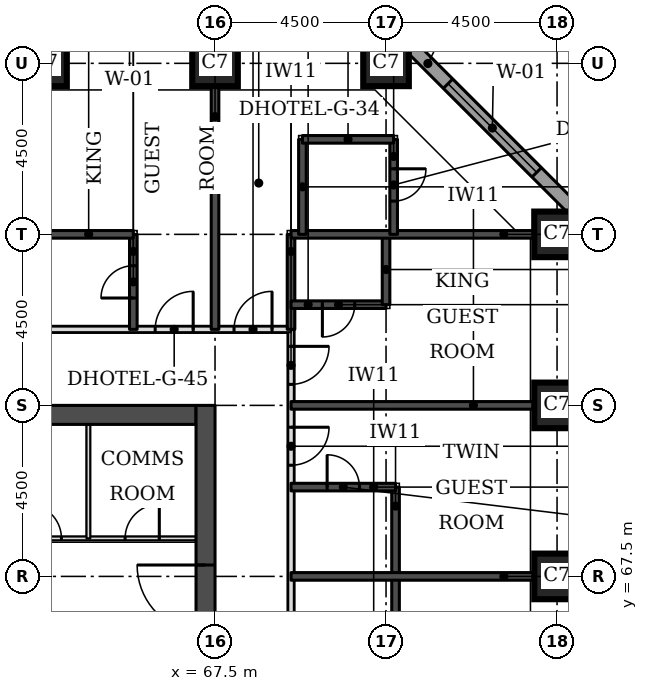
"""IFC4 building model, lengths in metres.
Left out: names, types, materials, properties, quantities, classifications, styles, units other than length and angle.
Written with IfcOpenShell. Run it as: python <this file> out.ifc"""

import sys

from ifc_helpers import new_model, si_unit, direction, frame, frame_2d, origin, origin_2d, place, context, subcontext, project, spatial, rectangle, extrude, element, fill, save


model = new_model("IFC4")
c1 = context("Model", 3, precision=1e-05, world=origin(), true_north=direction((0.0, 1.0)))
c2 = subcontext(c1, "Body", "Model", "MODEL_VIEW")
j1 = project(units=[si_unit("LENGTHUNIT", "METRE"), si_unit("PLANEANGLEUNIT", "RADIAN")], contexts=[c1])
p1 = place(None, origin())
s1 = spatial("IfcSite", under=j1, at=p1, CompositionType="ELEMENT")
p2 = place(p1, origin())
s2 = spatial("IfcBuilding", under=s1, at=p2, CompositionType="ELEMENT")
p3 = place(p2, frame((0.0, 0.0, 66.0)))
s3 = spatial("IfcBuildingStorey", under=s2, at=p3, CompositionType="ELEMENT", Elevation=66.0)
for number, where, z_axis, x_axis in (
    (1, (76.5, 67.5, 0.0), (0.0, 0.0, 1.0), (1.0, 0.0, 0.0)),
    (2, (76.5, 72.0, 0.0), (0.0, 0.0, 1.0), (1.0, 0.0, 0.0)),
    (3, (76.5, 76.5, 0.0), (0.0, 0.0, 1.0), (1.0, 0.0, 0.0)),
    (4, (63.0, 81.0, 0.0), (0.0, 0.0, 1.0), (1.0, 0.0, 0.0)),
    (5, (67.5, 81.0, 0.0), (0.0, 0.0, 1.0), (1.0, 0.0, 0.0)),
    (6, (72.0, 81.0, 0.0), (0.0, 0.0, 1.0), (1.0, 0.0, 0.0)),
):
    element("IfcColumn", number, at=place(p3, frame(where, z_axis=z_axis, x_axis=x_axis)), inside=s3, PredefinedType="COLUMN", context=c2, shape_type="SweptSolid", body=[
        extrude(rectangle(XDim=1.2, YDim=1.2, at=origin_2d()), origin(), (0.0, 0.0, 1.0), 3.3),
    ])
p4 = place(p3, frame((45.5, 71.75, 0.0), z_axis=(0.0, 0.0, 1.0), x_axis=(1.0, 0.0, 0.0)))
e7 = element("IfcWall", 7, at=p4, inside=s3, PredefinedType="SHEAR", context=c2, shape_type="SweptSolid", body=[
    extrude(rectangle(XDim=21.5, YDim=0.5, at=frame_2d((10.75, 0.0))), origin(), (0.0, 0.0, 1.0), 3.3),
])
p5 = place(p3, frame((67.25, 49.5, 0.0), z_axis=(0.0, 0.0, 1.0), x_axis=(0.0, 1.0, 0.0)))
e8 = element("IfcWall", 8, at=p5, inside=s3, PredefinedType="SHEAR", context=c2, shape_type="SweptSolid", body=[
    extrude(rectangle(XDim=22.5, YDim=0.5, at=frame_2d((11.25, 0.0))), origin(), (0.0, 0.0, 1.0), 3.3),
])
p6 = place(p5, frame((4.2, 0.0, 0.0)))
e9 = element("IfcOpeningElement", 9, at=p6, cuts=e8, PredefinedType="OPENING", context=c2, shape_type="SweptSolid", body=[
    extrude(rectangle(XDim=1.8, YDim=2.1, at=frame_2d((0.9, 1.05))), frame((0.0, 0.26, 0.0), z_axis=(0.0, -1.0, 0.0), x_axis=(1.0, 0.0, 0.0)), (0.0, 0.0, 1.0), 0.52),
])
p7 = place(p5, frame((6.9, 0.0, 0.0)))
e10 = element("IfcOpeningElement", 10, at=p7, cuts=e8, PredefinedType="OPENING", context=c2, shape_type="SweptSolid", body=[
    extrude(rectangle(XDim=1.1, YDim=2.1, at=frame_2d((0.55, 1.05))), frame((0.0, 0.26, 0.0), z_axis=(0.0, -1.0, 0.0), x_axis=(1.0, 0.0, 0.0)), (0.0, 0.0, 1.0), 0.52),
])
p8 = place(p5, frame((13.6, 0.0, 0.0)))
e11 = element("IfcOpeningElement", 11, at=p8, cuts=e8, PredefinedType="OPENING", context=c2, shape_type="SweptSolid", body=[
    extrude(rectangle(XDim=1.1, YDim=2.1, at=frame_2d((0.55, 1.05))), frame((0.0, 0.26, 0.0), z_axis=(0.0, -1.0, 0.0), x_axis=(1.0, 0.0, 0.0)), (0.0, 0.0, 1.0), 0.52),
])
p9 = place(p5, frame((16.5, 0.0, 0.0)))
e12 = element("IfcOpeningElement", 12, at=p9, cuts=e8, PredefinedType="OPENING", context=c2, shape_type="SweptSolid", body=[
    extrude(rectangle(XDim=1.8, YDim=2.1, at=frame_2d((0.9, 1.05))), frame((0.0, 0.26, 0.0), z_axis=(0.0, -1.0, 0.0), x_axis=(1.0, 0.0, 0.0)), (0.0, 0.0, 1.0), 0.52),
])
p10 = place(p3, frame((77.326, 76.77, 0.0), z_axis=(0.0, 0.0, 1.0), x_axis=(-0.707106781187, 0.707106781187, 0.0)))
e13 = element("IfcWall", 13, at=p10, inside=s3, PredefinedType="STANDARD", context=c2, shape_type="SweptSolid", body=[
    extrude(rectangle(XDim=7.151, YDim=0.35, at=frame_2d((3.576, 0.0))), origin(), (0.0, 0.0, 1.0), 3.055),
])
p11 = place(p10, frame((1.926, 0.0, 0.8)))
e14 = element("IfcOpeningElement", 14, at=p11, cuts=e13, PredefinedType="OPENING", context=c2, shape_type="SweptSolid", body=[
    extrude(rectangle(XDim=3.3, YDim=1.5, at=frame_2d((1.65, 0.75))), frame((0.0, 0.185, 0.0), z_axis=(0.0, -1.0, 0.0), x_axis=(1.0, 0.0, 0.0)), (0.0, 0.0, 1.0), 0.37),
])
p12 = place(p3, frame((69.5, 47.5, 0.0), z_axis=(0.0, 0.0, 1.0), x_axis=(0.0, 1.0, 0.0)))
e15 = element("IfcWall", 15, at=p12, inside=s3, PredefinedType="PARTITIONING", context=c2, shape_type="SweptSolid", body=[
    extrude(rectangle(XDim=26.5, YDim=0.15, at=frame_2d((13.25, 0.0))), origin(), (0.0, 0.0, 1.0), 3.08),
])
p13 = place(p12, frame((25.053, 0.0, 0.0)))
e16 = element("IfcOpeningElement", 16, at=p13, cuts=e15, PredefinedType="OPENING", context=c2, shape_type="SweptSolid", body=[
    extrude(rectangle(XDim=1.0, YDim=2.1, at=frame_2d((0.5, 1.05))), frame((0.0, 0.085, 0.0), z_axis=(0.0, -1.0, 0.0), x_axis=(1.0, 0.0, 0.0)), (0.0, 0.0, 1.0), 0.17),
])
p14 = place(p12, frame((22.925, 0.0, 0.0)))
e17 = element("IfcOpeningElement", 17, at=p14, cuts=e15, PredefinedType="OPENING", context=c2, shape_type="SweptSolid", body=[
    extrude(rectangle(XDim=1.0, YDim=2.1, at=frame_2d((0.5, 1.05))), frame((0.0, 0.085, 0.0), z_axis=(0.0, -1.0, 0.0), x_axis=(1.0, 0.0, 0.0)), (0.0, 0.0, 1.0), 0.17),
])
p15 = place(p12, frame((16.325, 0.0, 0.0)))
e18 = element("IfcOpeningElement", 18, at=p15, cuts=e15, PredefinedType="OPENING", context=c2, shape_type="SweptSolid", body=[
    extrude(rectangle(XDim=1.0, YDim=2.1, at=frame_2d((0.5, 1.05))), frame((0.0, 0.085, 0.0), z_axis=(0.0, -1.0, 0.0), x_axis=(1.0, 0.0, 0.0)), (0.0, 0.0, 1.0), 0.17),
])
p16 = place(p12, frame((13.925, 0.0, 0.0)))
e19 = element("IfcOpeningElement", 19, at=p16, cuts=e15, PredefinedType="OPENING", context=c2, shape_type="SweptSolid", body=[
    extrude(rectangle(XDim=1.0, YDim=2.1, at=frame_2d((0.5, 1.05))), frame((0.0, 0.085, 0.0), z_axis=(0.0, -1.0, 0.0), x_axis=(1.0, 0.0, 0.0)), (0.0, 0.0, 1.0), 0.17),
])
p17 = place(p12, frame((4.25, 0.0, 0.0)))
e20 = element("IfcOpeningElement", 20, at=p17, cuts=e15, PredefinedType="OPENING", context=c2, shape_type="SweptSolid", body=[
    extrude(rectangle(XDim=1.1, YDim=2.1, at=frame_2d((0.55, 1.05))), frame((0.0, 0.085, 0.0), z_axis=(0.0, -1.0, 0.0), x_axis=(1.0, 0.0, 0.0)), (0.0, 0.0, 1.0), 0.17),
])
p18 = place(p12, frame((0.447, 0.0, 0.0)))
e21 = element("IfcOpeningElement", 21, at=p18, cuts=e15, PredefinedType="OPENING", context=c2, shape_type="SweptSolid", body=[
    extrude(rectangle(XDim=1.0, YDim=2.1, at=frame_2d((0.5, 1.05))), frame((0.0, 0.085, 0.0), z_axis=(0.0, -1.0, 0.0), x_axis=(1.0, 0.0, 0.0)), (0.0, 0.0, 1.0), 0.17),
])
p19 = place(p3, frame((43.0, 74.0, 0.0), z_axis=(0.0, 0.0, 1.0), x_axis=(1.0, 0.0, 0.0)))
e22 = element("IfcWall", 22, at=p19, inside=s3, PredefinedType="PARTITIONING", context=c2, shape_type="SweptSolid", body=[
    extrude(rectangle(XDim=26.5, YDim=0.15, at=frame_2d((13.25, 0.0))), origin(), (0.0, 0.0, 1.0), 3.08),
])
p20 = place(p19, frame((4.925, 0.0, 0.0)))
e23 = element("IfcOpeningElement", 23, at=p20, cuts=e22, PredefinedType="OPENING", context=c2, shape_type="SweptSolid", body=[
    extrude(rectangle(XDim=1.0, YDim=2.1, at=frame_2d((0.5, 1.05))), frame((0.0, 0.085, 0.0), z_axis=(0.0, -1.0, 0.0), x_axis=(1.0, 0.0, 0.0)), (0.0, 0.0, 1.0), 0.17),
])
p21 = place(p19, frame((7.325, 0.0, 0.0)))
e24 = element("IfcOpeningElement", 24, at=p21, cuts=e22, PredefinedType="OPENING", context=c2, shape_type="SweptSolid", body=[
    extrude(rectangle(XDim=1.0, YDim=2.1, at=frame_2d((0.5, 1.05))), frame((0.0, 0.085, 0.0), z_axis=(0.0, -1.0, 0.0), x_axis=(1.0, 0.0, 0.0)), (0.0, 0.0, 1.0), 0.17),
])
p22 = place(p19, frame((13.925, 0.0, 0.0)))
e25 = element("IfcOpeningElement", 25, at=p22, cuts=e22, PredefinedType="OPENING", context=c2, shape_type="SweptSolid", body=[
    extrude(rectangle(XDim=1.0, YDim=2.1, at=frame_2d((0.5, 1.05))), frame((0.0, 0.085, 0.0), z_axis=(0.0, -1.0, 0.0), x_axis=(1.0, 0.0, 0.0)), (0.0, 0.0, 1.0), 0.17),
])
p23 = place(p19, frame((16.325, 0.0, 0.0)))
e26 = element("IfcOpeningElement", 26, at=p23, cuts=e22, PredefinedType="OPENING", context=c2, shape_type="SweptSolid", body=[
    extrude(rectangle(XDim=1.0, YDim=2.1, at=frame_2d((0.5, 1.05))), frame((0.0, 0.085, 0.0), z_axis=(0.0, -1.0, 0.0), x_axis=(1.0, 0.0, 0.0)), (0.0, 0.0, 1.0), 0.17),
])
p24 = place(p19, frame((22.925, 0.0, 0.0)))
e27 = element("IfcOpeningElement", 27, at=p24, cuts=e22, PredefinedType="OPENING", context=c2, shape_type="SweptSolid", body=[
    extrude(rectangle(XDim=1.0, YDim=2.1, at=frame_2d((0.5, 1.05))), frame((0.0, 0.085, 0.0), z_axis=(0.0, -1.0, 0.0), x_axis=(1.0, 0.0, 0.0)), (0.0, 0.0, 1.0), 0.17),
])
p25 = place(p19, frame((0.5, 0.0, 0.0)))
e28 = element("IfcOpeningElement", 28, at=p25, cuts=e22, PredefinedType="OPENING", context=c2, shape_type="SweptSolid", body=[
    extrude(rectangle(XDim=1.0, YDim=2.1, at=frame_2d((0.5, 1.05))), frame((0.0, 0.085, 0.0), z_axis=(0.0, -1.0, 0.0), x_axis=(1.0, 0.0, 0.0)), (0.0, 0.0, 1.0), 0.17),
])
p26 = place(p19, frame((25.0, 0.0, 0.0)))
e29 = element("IfcOpeningElement", 29, at=p26, cuts=e22, PredefinedType="OPENING", context=c2, shape_type="SweptSolid", body=[
    extrude(rectangle(XDim=1.0, YDim=2.1, at=frame_2d((0.5, 1.05))), frame((0.0, 0.085, 0.0), z_axis=(0.0, -1.0, 0.0), x_axis=(1.0, 0.0, 0.0)), (0.0, 0.0, 1.0), 0.17),
])
p27 = place(p3, frame((72.25, 65.65, 0.0), z_axis=(0.0, 0.0, 1.0), x_axis=(0.0, 1.0, 0.0)))
e30 = element("IfcWall", 30, at=p27, inside=s3, PredefinedType="SOLIDWALL", context=c2, shape_type="SweptSolid", body=[
    extrude(rectangle(XDim=4.2, YDim=0.2, at=frame_2d((2.1, 0.0))), origin(), (0.0, 0.0, 1.0), 3.08),
])
p28 = place(p3, frame((69.5, 67.5, 0.0), z_axis=(0.0, 0.0, 1.0), x_axis=(1.0, 0.0, 0.0)))
e31 = element("IfcWall", 31, at=p28, inside=s3, PredefinedType="SOLIDWALL", context=c2, shape_type="SweptSolid", body=[
    extrude(rectangle(XDim=6.4, YDim=0.2, at=frame_2d((3.2, 0.0))), origin(), (0.0, 0.0, 1.0), 3.08),
])
p29 = place(p3, frame((69.5, 69.85, 0.0), z_axis=(0.0, 0.0, 1.0), x_axis=(1.0, 0.0, 0.0)))
e32 = element("IfcWall", 32, at=p29, inside=s3, PredefinedType="SOLIDWALL", context=c2, shape_type="SweptSolid", body=[
    extrude(rectangle(XDim=2.75, YDim=0.2, at=frame_2d((1.375, 0.0))), origin(), (0.0, 0.0, 1.0), 3.08),
])
p30 = place(p29, frame((0.95, 0.0, 0.0)))
e33 = element("IfcOpeningElement", 33, at=p30, cuts=e32, PredefinedType="OPENING", context=c2, shape_type="SweptSolid", body=[
    extrude(rectangle(XDim=0.85, YDim=2.1, at=frame_2d((0.425, 1.05))), frame((0.0, 0.11, 0.0), z_axis=(0.0, -1.0, 0.0), x_axis=(1.0, 0.0, 0.0)), (0.0, 0.0, 1.0), 0.22),
])
p31 = place(p3, frame((69.5, 72.0, 0.0), z_axis=(0.0, 0.0, 1.0), x_axis=(1.0, 0.0, 0.0)))
e34 = element("IfcWall", 34, at=p31, inside=s3, PredefinedType="SOLIDWALL", context=c2, shape_type="SweptSolid", body=[
    extrude(rectangle(XDim=6.4, YDim=0.2, at=frame_2d((3.2, 0.0))), origin(), (0.0, 0.0, 1.0), 3.08),
])
p32 = place(p3, frame((65.35, 74.0, 0.0), z_axis=(0.0, 0.0, 1.0), x_axis=(0.0, 1.0, 0.0)))
e35 = element("IfcWall", 35, at=p32, inside=s3, PredefinedType="SOLIDWALL", context=c2, shape_type="SweptSolid", body=[
    extrude(rectangle(XDim=2.5, YDim=0.2, at=frame_2d((1.25, 0.0))), origin(), (0.0, 0.0, 1.0), 3.08),
])
p33 = place(p32, frame((0.825, 0.0, 0.0)))
e36 = element("IfcOpeningElement", 36, at=p33, cuts=e35, PredefinedType="OPENING", context=c2, shape_type="SweptSolid", body=[
    extrude(rectangle(XDim=0.85, YDim=2.1, at=frame_2d((0.425, 1.05))), frame((0.0, 0.11, 0.0), z_axis=(0.0, -1.0, 0.0), x_axis=(1.0, 0.0, 0.0)), (0.0, 0.0, 1.0), 0.22),
])
p34 = place(p3, frame((67.5, 74.0, 0.0), z_axis=(0.0, 0.0, 1.0), x_axis=(0.0, 1.0, 0.0)))
e37 = element("IfcWall", 37, at=p34, inside=s3, PredefinedType="SOLIDWALL", context=c2, shape_type="SweptSolid", body=[
    extrude(rectangle(XDim=6.4, YDim=0.2, at=frame_2d((3.2, 0.0))), origin(), (0.0, 0.0, 1.0), 3.08),
])
p35 = place(p3, frame((69.5, 74.0, 0.0), z_axis=(0.0, 0.0, 1.0), x_axis=(0.0, 1.0, 0.0)))
e38 = element("IfcWall", 38, at=p35, inside=s3, PredefinedType="SOLIDWALL", context=c2, shape_type="SweptSolid", body=[
    extrude(rectangle(XDim=2.5, YDim=0.2, at=frame_2d((1.25, 0.0))), origin(), (0.0, 0.0, 1.0), 3.08),
])
p36 = place(p3, frame((69.5, 74.65, 0.0), z_axis=(0.0, 0.0, 1.0), x_axis=(1.0, 0.0, 0.0)))
e39 = element("IfcWall", 39, at=p36, inside=s3, PredefinedType="SOLIDWALL", context=c2, shape_type="SweptSolid", body=[
    extrude(rectangle(XDim=2.5, YDim=0.2, at=frame_2d((1.25, 0.0))), origin(), (0.0, 0.0, 1.0), 3.08),
])
p37 = place(p36, frame((0.825, 0.0, 0.0)))
e40 = element("IfcOpeningElement", 40, at=p37, cuts=e39, PredefinedType="OPENING", context=c2, shape_type="SweptSolid", body=[
    extrude(rectangle(XDim=0.85, YDim=2.1, at=frame_2d((0.425, 1.05))), frame((0.0, 0.11, 0.0), z_axis=(0.0, -1.0, 0.0), x_axis=(1.0, 0.0, 0.0)), (0.0, 0.0, 1.0), 0.22),
])
p38 = place(p3, frame((72.0, 74.65, 0.0), z_axis=(0.0, 0.0, 1.0), x_axis=(0.0, 1.0, 0.0)))
e41 = element("IfcWall", 41, at=p38, inside=s3, PredefinedType="SOLIDWALL", context=c2, shape_type="SweptSolid", body=[
    extrude(rectangle(XDim=1.85, YDim=0.2, at=frame_2d((0.925, 0.0))), origin(), (0.0, 0.0, 1.0), 3.08),
])
p39 = place(p3, frame((63.0, 76.5, 0.0), z_axis=(0.0, 0.0, 1.0), x_axis=(1.0, 0.0, 0.0)))
e42 = element("IfcWall", 42, at=p39, inside=s3, PredefinedType="SOLIDWALL", context=c2, shape_type="SweptSolid", body=[
    extrude(rectangle(XDim=2.35, YDim=0.2, at=frame_2d((1.175, 0.0))), origin(), (0.0, 0.0, 1.0), 3.08),
])
p40 = place(p3, frame((69.5, 76.5, 0.0), z_axis=(0.0, 0.0, 1.0), x_axis=(1.0, 0.0, 0.0)))
e43 = element("IfcWall", 43, at=p40, inside=s3, PredefinedType="SOLIDWALL", context=c2, shape_type="SweptSolid", body=[
    extrude(rectangle(XDim=6.4, YDim=0.2, at=frame_2d((3.2, 0.0))), origin(), (0.0, 0.0, 1.0), 3.08),
])
p41 = place(p3, frame((69.8, 76.5, 0.0), z_axis=(0.0, 0.0, 1.0), x_axis=(0.0, 1.0, 0.0)))
e44 = element("IfcWall", 44, at=p41, inside=s3, PredefinedType="SOLIDWALL", context=c2, shape_type="SweptSolid", body=[
    extrude(rectangle(XDim=2.5, YDim=0.2, at=frame_2d((1.25, 0.0))), origin(), (0.0, 0.0, 1.0), 3.08),
])
p42 = place(p3, frame((72.2, 76.5, 0.0), z_axis=(0.0, 0.0, 1.0), x_axis=(0.0, 1.0, 0.0)))
e45 = element("IfcWall", 45, at=p42, inside=s3, PredefinedType="SOLIDWALL", context=c2, shape_type="SweptSolid", body=[
    extrude(rectangle(XDim=2.5, YDim=0.2, at=frame_2d((1.25, 0.0))), origin(), (0.0, 0.0, 1.0), 3.08),
])
p43 = place(p42, frame((0.875, 0.0, 0.0)))
e46 = element("IfcOpeningElement", 46, at=p43, cuts=e45, PredefinedType="OPENING", context=c2, shape_type="SweptSolid", body=[
    extrude(rectangle(XDim=0.85, YDim=2.1, at=frame_2d((0.425, 1.05))), frame((0.0, 0.11, 0.0), z_axis=(0.0, -1.0, 0.0), x_axis=(1.0, 0.0, 0.0)), (0.0, 0.0, 1.0), 0.22),
])
p44 = place(p3, frame((69.8, 79.0, 0.0), z_axis=(0.0, 0.0, 1.0), x_axis=(1.0, 0.0, 0.0)))
e47 = element("IfcWall", 47, at=p44, inside=s3, PredefinedType="SOLIDWALL", context=c2, shape_type="SweptSolid", body=[
    extrude(rectangle(XDim=2.4, YDim=0.2, at=frame_2d((1.2, 0.0))), origin(), (0.0, 0.0, 1.0), 3.08),
])
p45 = place(p3, frame((61.85, 68.5, 0.0), z_axis=(0.0, 0.0, 1.0), x_axis=(1.0, 0.0, 0.0)))
e48 = element("IfcWall", 48, at=p45, inside=s3, PredefinedType="PARTITIONING", context=c2, shape_type="SweptSolid", body=[
    extrude(rectangle(XDim=5.15, YDim=0.1, at=frame_2d((2.575, 0.0))), origin(), (0.0, 0.0, 1.0), 3.08),
])
p46 = place(p45, frame((3.284, 0.0, 0.0)))
e49 = element("IfcOpeningElement", 49, at=p46, cuts=e48, PredefinedType="OPENING", context=c2, shape_type="SweptSolid", body=[
    extrude(rectangle(XDim=0.9, YDim=2.1, at=frame_2d((0.45, 1.05))), frame((0.0, 0.06, 0.0), z_axis=(0.0, -1.0, 0.0), x_axis=(1.0, 0.0, 0.0)), (0.0, 0.0, 1.0), 0.12),
])
p47 = place(p45, frame((0.709, 0.0, 0.0)))
e50 = element("IfcOpeningElement", 50, at=p47, cuts=e48, PredefinedType="OPENING", context=c2, shape_type="SweptSolid", body=[
    extrude(rectangle(XDim=0.9, YDim=2.1, at=frame_2d((0.45, 1.05))), frame((0.0, 0.06, 0.0), z_axis=(0.0, -1.0, 0.0), x_axis=(1.0, 0.0, 0.0)), (0.0, 0.0, 1.0), 0.12),
])
p48 = place(p3, frame((64.167, 68.5, 0.0), z_axis=(0.0, 0.0, 1.0), x_axis=(0.0, 1.0, 0.0)))
e51 = element("IfcWall", 51, at=p48, inside=s3, PredefinedType="PARTITIONING", context=c2, shape_type="SweptSolid", body=[
    extrude(rectangle(XDim=3.0, YDim=0.1, at=frame_2d((1.5, 0.0))), origin(), (0.0, 0.0, 1.0), 3.08),
])
p49 = place(p11, origin())
e52 = element("IfcWindow", 52, at=p49, inside=s3, PartitioningType="SINGLE_PANEL", PredefinedType="WINDOW", context=c2, shape_type="SweptSolid", body=[
    extrude(rectangle(XDim=3.3, YDim=1.5, at=frame_2d((1.65, 0.75))), frame((0.0, 0.085, 0.0), z_axis=(0.0, -1.0, 0.0), x_axis=(1.0, 0.0, 0.0)), (0.0, 0.0, 1.0), 0.06),
])
fill(e14, e52)
p50 = place(p24, origin())
e53 = element("IfcDoor", 53, at=p50, inside=s3, OperationType="SINGLE_SWING_RIGHT", PredefinedType="DOOR", context=c2, shape_type="SweptSolid", body=[
    extrude(rectangle(XDim=1.0, YDim=2.1, at=frame_2d((0.5, 1.05))), frame((0.0, 0.025, 0.0), z_axis=(0.0, -1.0, 0.0), x_axis=(1.0, 0.0, 0.0)), (0.0, 0.0, 1.0), 0.05),
])
fill(e27, e53)
p51 = place(p33, origin())
e54 = element("IfcDoor", 54, at=p51, inside=s3, OperationType="SINGLE_SWING_LEFT", PredefinedType="DOOR", context=c2, shape_type="SweptSolid", body=[
    extrude(rectangle(XDim=0.85, YDim=2.1, at=frame_2d((0.425, 1.05))), frame((0.0, 0.025, 0.0), z_axis=(0.0, -1.0, 0.0), x_axis=(1.0, 0.0, 0.0)), (0.0, 0.0, 1.0), 0.05),
])
fill(e36, e54)
p52 = place(p13, frame((1.0, 0.0, 0.0), z_axis=(0.0, 0.0, 1.0), x_axis=(-1.0, 0.0, 0.0)))
e55 = element("IfcDoor", 55, at=p52, inside=s3, OperationType="SINGLE_SWING_LEFT", PredefinedType="DOOR", context=c2, shape_type="SweptSolid", body=[
    extrude(rectangle(XDim=1.0, YDim=2.1, at=frame_2d((0.5, 1.05))), frame((0.0, 0.025, 0.0), z_axis=(0.0, -1.0, 0.0), x_axis=(1.0, 0.0, 0.0)), (0.0, 0.0, 1.0), 0.05),
])
fill(e16, e55)
p53 = place(p37, frame((0.85, 0.0, 0.0), z_axis=(0.0, 0.0, 1.0), x_axis=(-1.0, 0.0, 0.0)))
e56 = element("IfcDoor", 56, at=p53, inside=s3, OperationType="SINGLE_SWING_RIGHT", PredefinedType="DOOR", context=c2, shape_type="SweptSolid", body=[
    extrude(rectangle(XDim=0.85, YDim=2.1, at=frame_2d((0.425, 1.05))), frame((0.0, 0.025, 0.0), z_axis=(0.0, -1.0, 0.0), x_axis=(1.0, 0.0, 0.0)), (0.0, 0.0, 1.0), 0.05),
])
fill(e40, e56)
p54 = place(p14, frame((1.0, 0.0, 0.0), z_axis=(0.0, 0.0, 1.0), x_axis=(-1.0, 0.0, 0.0)))
e57 = element("IfcDoor", 57, at=p54, inside=s3, OperationType="SINGLE_SWING_LEFT", PredefinedType="DOOR", context=c2, shape_type="SweptSolid", body=[
    extrude(rectangle(XDim=1.0, YDim=2.1, at=frame_2d((0.5, 1.05))), frame((0.0, 0.025, 0.0), z_axis=(0.0, -1.0, 0.0), x_axis=(1.0, 0.0, 0.0)), (0.0, 0.0, 1.0), 0.05),
])
fill(e17, e57)
p55 = place(p30, origin())
e58 = element("IfcDoor", 58, at=p55, inside=s3, OperationType="SINGLE_SWING_LEFT", PredefinedType="DOOR", context=c2, shape_type="SweptSolid", body=[
    extrude(rectangle(XDim=0.85, YDim=2.1, at=frame_2d((0.425, 1.05))), frame((0.0, 0.025, 0.0), z_axis=(0.0, -1.0, 0.0), x_axis=(1.0, 0.0, 0.0)), (0.0, 0.0, 1.0), 0.05),
])
fill(e33, e58)
p56 = place(p26, origin())
e59 = element("IfcDoor", 59, at=p56, inside=s3, OperationType="SINGLE_SWING_RIGHT", PredefinedType="DOOR", context=c2, shape_type="SweptSolid", body=[
    extrude(rectangle(XDim=1.0, YDim=2.1, at=frame_2d((0.5, 1.05))), frame((0.0, 0.025, 0.0), z_axis=(0.0, -1.0, 0.0), x_axis=(1.0, 0.0, 0.0)), (0.0, 0.0, 1.0), 0.05),
])
fill(e29, e59)
p57 = place(p43, frame((0.85, 0.0, 0.0), z_axis=(0.0, 0.0, 1.0), x_axis=(-1.0, 0.0, 0.0)))
e60 = element("IfcDoor", 60, at=p57, inside=s3, OperationType="SINGLE_SWING_LEFT", PredefinedType="DOOR", context=c2, shape_type="SweptSolid", body=[
    extrude(rectangle(XDim=0.85, YDim=2.1, at=frame_2d((0.425, 1.05))), frame((0.0, 0.025, 0.0), z_axis=(0.0, -1.0, 0.0), x_axis=(1.0, 0.0, 0.0)), (0.0, 0.0, 1.0), 0.05),
])
fill(e46, e60)
p58 = place(p9, origin())
e61 = element("IfcDoor", 61, at=p58, inside=s3, OperationType="SINGLE_SWING_RIGHT", PredefinedType="DOOR", context=c2, shape_type="SweptSolid", body=[
    extrude(rectangle(XDim=1.8, YDim=2.1, at=frame_2d((0.9, 1.05))), frame((0.0, 0.025, 0.0), z_axis=(0.0, -1.0, 0.0), x_axis=(1.0, 0.0, 0.0)), (0.0, 0.0, 1.0), 0.05),
])
fill(e12, e61)
p59 = place(p46, origin())
e62 = element("IfcDoor", 62, at=p59, inside=s3, OperationType="SINGLE_SWING_RIGHT", PredefinedType="DOOR", context=c2, shape_type="SweptSolid", body=[
    extrude(rectangle(XDim=0.9, YDim=2.1, at=frame_2d((0.45, 1.05))), frame((0.0, 0.025, 0.0), z_axis=(0.0, -1.0, 0.0), x_axis=(1.0, 0.0, 0.0)), (0.0, 0.0, 1.0), 0.05),
])
fill(e49, e62)
p60 = place(p47, origin())
e63 = element("IfcDoor", 63, at=p60, inside=s3, OperationType="SINGLE_SWING_LEFT", PredefinedType="DOOR", context=c2, shape_type="SweptSolid", body=[
    extrude(rectangle(XDim=0.9, YDim=2.1, at=frame_2d((0.45, 1.05))), frame((0.0, 0.025, 0.0), z_axis=(0.0, -1.0, 0.0), x_axis=(1.0, 0.0, 0.0)), (0.0, 0.0, 1.0), 0.05),
])
fill(e50, e63)
save(model, sys.argv[1])
